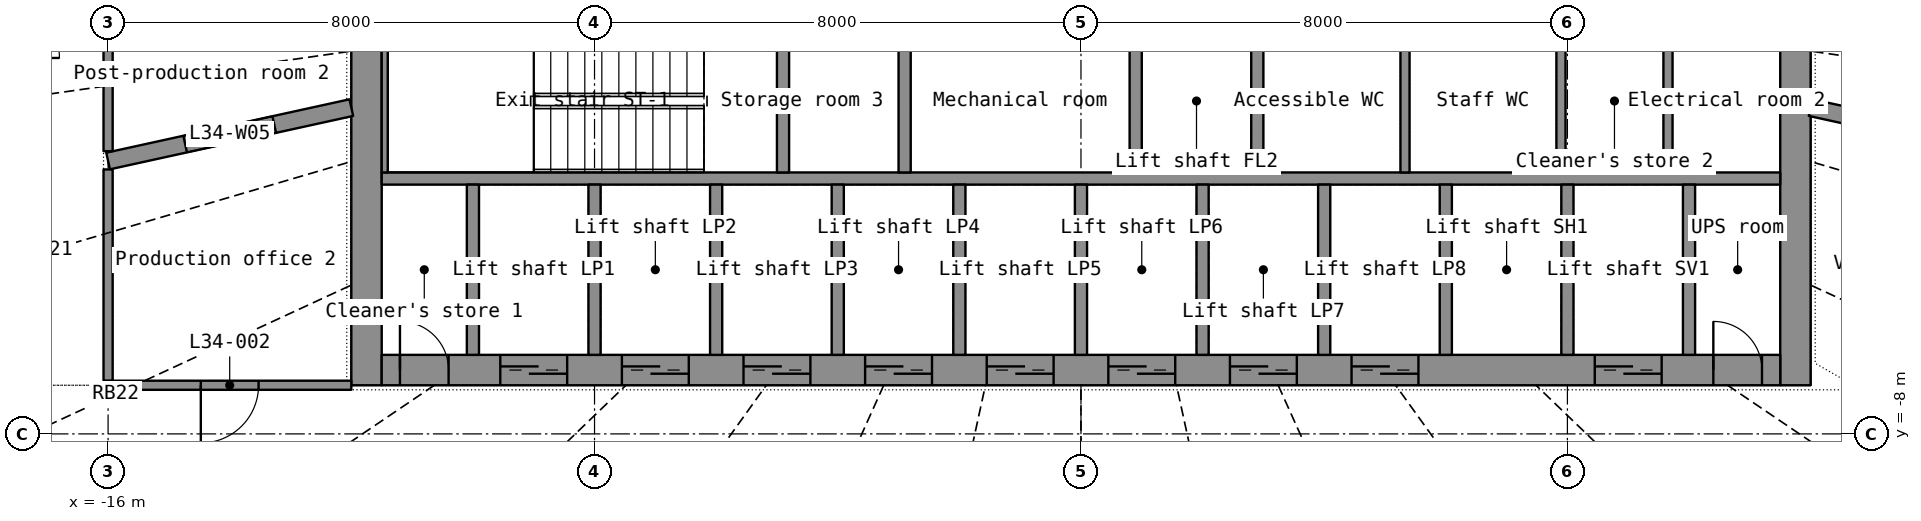
"""IFC4 building model, lengths in metres.
Left out: names, types, materials, properties, quantities, classifications, styles, units other than length and angle.
Written with IfcOpenShell. Run it as: python <this file> out.ifc"""

import sys

from ifc_helpers import new_model, si_unit, direction, frame, frame_2d, origin, place, context, subcontext, project, spatial, rectangle, extrude, element, fill, save


model = new_model("IFC4")
c1 = context("Model", 3, precision=1e-05, world=origin(), true_north=direction((0.0, 1.0)))
c2 = subcontext(c1, "Body", "Model", "MODEL_VIEW")
j1 = project(units=[si_unit("LENGTHUNIT", "METRE"), si_unit("PLANEANGLEUNIT", "RADIAN")], contexts=[c1])
p1 = place(None, origin())
s1 = spatial("IfcSite", under=j1, at=p1, CompositionType="ELEMENT")
p2 = place(p1, origin())
s2 = spatial("IfcBuilding", under=s1, at=p2, CompositionType="ELEMENT")
p3 = place(p2, frame((0.0, 0.0, 141.5)))
s3 = spatial("IfcBuildingStorey", under=s2, at=p3, CompositionType="ELEMENT", Elevation=141.5)
p4 = place(p3, frame((-11.75, -7.2, 0.0), z_axis=(0.0, 0.0, 1.0), x_axis=(0.0, 1.0, 0.0)))
e1 = element("IfcWall", 1, at=p4, inside=s3, PredefinedType="SHEAR", context=c2, shape_type="SweptSolid", body=[
    extrude(rectangle(XDim=14.4, YDim=0.5, at=frame_2d((7.2, 0.0))), origin(), (0.0, 0.0, 1.0), 3.3),
])
p5 = place(p4, frame((6.5, 0.0, 0.0)))
e2 = element("IfcOpeningElement", 2, at=p5, cuts=e1, PredefinedType="OPENING", context=c2, shape_type="SweptSolid", body=[
    extrude(rectangle(XDim=1.4, YDim=2.2, at=frame_2d((0.7, 1.1))), frame((0.0, 0.26, 0.0), z_axis=(0.0, -1.0, 0.0), x_axis=(1.0, 0.0, 0.0)), (0.0, 0.0, 1.0), 0.52),
])
p6 = place(p3, frame((11.75, -7.2, 0.0), z_axis=(0.0, 0.0, 1.0), x_axis=(0.0, 1.0, 0.0)))
e3 = element("IfcWall", 3, at=p6, inside=s3, PredefinedType="SHEAR", context=c2, shape_type="SweptSolid", body=[
    extrude(rectangle(XDim=14.4, YDim=0.5, at=frame_2d((7.2, 0.0))), origin(), (0.0, 0.0, 1.0), 3.3),
])
p7 = place(p6, frame((6.5, 0.0, 0.0)))
e4 = element("IfcOpeningElement", 4, at=p7, cuts=e3, PredefinedType="OPENING", context=c2, shape_type="SweptSolid", body=[
    extrude(rectangle(XDim=1.4, YDim=2.2, at=frame_2d((0.7, 1.1))), frame((0.0, 0.26, 0.0), z_axis=(0.0, -1.0, 0.0), x_axis=(1.0, 0.0, 0.0)), (0.0, 0.0, 1.0), 0.52),
])
p8 = place(p3, frame((-11.5, -6.95, 0.0), z_axis=(0.0, 0.0, 1.0), x_axis=(1.0, 0.0, 0.0)))
e5 = element("IfcWall", 5, at=p8, inside=s3, PredefinedType="SHEAR", context=c2, shape_type="SweptSolid", body=[
    extrude(rectangle(XDim=23.0, YDim=0.5, at=frame_2d((11.5, 0.0))), origin(), (0.0, 0.0, 1.0), 3.3),
])
p9 = place(p8, frame((1.95, 0.0, 0.0)))
e6 = element("IfcOpeningElement", 6, at=p9, cuts=e5, PredefinedType="OPENING", context=c2, shape_type="SweptSolid", body=[
    extrude(rectangle(XDim=1.1, YDim=2.2, at=frame_2d((0.55, 1.1))), frame((0.0, 0.26, 0.0), z_axis=(0.0, -1.0, 0.0), x_axis=(1.0, 0.0, 0.0)), (0.0, 0.0, 1.0), 0.52),
])
p10 = place(p8, frame((3.95, 0.0, 0.0)))
e7 = element("IfcOpeningElement", 7, at=p10, cuts=e5, PredefinedType="OPENING", context=c2, shape_type="SweptSolid", body=[
    extrude(rectangle(XDim=1.1, YDim=2.2, at=frame_2d((0.55, 1.1))), frame((0.0, 0.26, 0.0), z_axis=(0.0, -1.0, 0.0), x_axis=(1.0, 0.0, 0.0)), (0.0, 0.0, 1.0), 0.52),
])
p11 = place(p8, frame((5.95, 0.0, 0.0)))
e8 = element("IfcOpeningElement", 8, at=p11, cuts=e5, PredefinedType="OPENING", context=c2, shape_type="SweptSolid", body=[
    extrude(rectangle(XDim=1.1, YDim=2.2, at=frame_2d((0.55, 1.1))), frame((0.0, 0.26, 0.0), z_axis=(0.0, -1.0, 0.0), x_axis=(1.0, 0.0, 0.0)), (0.0, 0.0, 1.0), 0.52),
])
p12 = place(p8, frame((7.95, 0.0, 0.0)))
e9 = element("IfcOpeningElement", 9, at=p12, cuts=e5, PredefinedType="OPENING", context=c2, shape_type="SweptSolid", body=[
    extrude(rectangle(XDim=1.1, YDim=2.2, at=frame_2d((0.55, 1.1))), frame((0.0, 0.26, 0.0), z_axis=(0.0, -1.0, 0.0), x_axis=(1.0, 0.0, 0.0)), (0.0, 0.0, 1.0), 0.52),
])
p13 = place(p8, frame((9.95, 0.0, 0.0)))
e10 = element("IfcOpeningElement", 10, at=p13, cuts=e5, PredefinedType="OPENING", context=c2, shape_type="SweptSolid", body=[
    extrude(rectangle(XDim=1.1, YDim=2.2, at=frame_2d((0.55, 1.1))), frame((0.0, 0.26, 0.0), z_axis=(0.0, -1.0, 0.0), x_axis=(1.0, 0.0, 0.0)), (0.0, 0.0, 1.0), 0.52),
])
p14 = place(p8, frame((11.95, 0.0, 0.0)))
e11 = element("IfcOpeningElement", 11, at=p14, cuts=e5, PredefinedType="OPENING", context=c2, shape_type="SweptSolid", body=[
    extrude(rectangle(XDim=1.1, YDim=2.2, at=frame_2d((0.55, 1.1))), frame((0.0, 0.26, 0.0), z_axis=(0.0, -1.0, 0.0), x_axis=(1.0, 0.0, 0.0)), (0.0, 0.0, 1.0), 0.52),
])
p15 = place(p8, frame((13.95, 0.0, 0.0)))
e12 = element("IfcOpeningElement", 12, at=p15, cuts=e5, PredefinedType="OPENING", context=c2, shape_type="SweptSolid", body=[
    extrude(rectangle(XDim=1.1, YDim=2.2, at=frame_2d((0.55, 1.1))), frame((0.0, 0.26, 0.0), z_axis=(0.0, -1.0, 0.0), x_axis=(1.0, 0.0, 0.0)), (0.0, 0.0, 1.0), 0.52),
])
p16 = place(p8, frame((15.95, 0.0, 0.0)))
e13 = element("IfcOpeningElement", 13, at=p16, cuts=e5, PredefinedType="OPENING", context=c2, shape_type="SweptSolid", body=[
    extrude(rectangle(XDim=1.1, YDim=2.2, at=frame_2d((0.55, 1.1))), frame((0.0, 0.26, 0.0), z_axis=(0.0, -1.0, 0.0), x_axis=(1.0, 0.0, 0.0)), (0.0, 0.0, 1.0), 0.52),
])
p17 = place(p8, frame((19.95, 0.0, 0.0)))
e14 = element("IfcOpeningElement", 14, at=p17, cuts=e5, PredefinedType="OPENING", context=c2, shape_type="SweptSolid", body=[
    extrude(rectangle(XDim=1.1, YDim=2.2, at=frame_2d((0.55, 1.1))), frame((0.0, 0.26, 0.0), z_axis=(0.0, -1.0, 0.0), x_axis=(1.0, 0.0, 0.0)), (0.0, 0.0, 1.0), 0.52),
])
p18 = place(p8, frame((0.3, 0.0, 0.0)))
e15 = element("IfcOpeningElement", 15, at=p18, cuts=e5, PredefinedType="OPENING", context=c2, shape_type="SweptSolid", body=[
    extrude(rectangle(XDim=0.8, YDim=2.05, at=frame_2d((0.4, 1.025))), frame((0.0, 0.26, 0.0), z_axis=(0.0, -1.0, 0.0), x_axis=(1.0, 0.0, 0.0)), (0.0, 0.0, 1.0), 0.52),
])
p19 = place(p8, frame((21.9, 0.0, 0.0)))
e16 = element("IfcOpeningElement", 16, at=p19, cuts=e5, PredefinedType="OPENING", context=c2, shape_type="SweptSolid", body=[
    extrude(rectangle(XDim=0.8, YDim=2.05, at=frame_2d((0.4, 1.025))), frame((0.0, 0.26, 0.0), z_axis=(0.0, -1.0, 0.0), x_axis=(1.0, 0.0, 0.0)), (0.0, 0.0, 1.0), 0.52),
])
p20 = place(p3, frame((-11.5, -3.8, 0.0), z_axis=(0.0, 0.0, 1.0), x_axis=(1.0, 0.0, 0.0)))
e17 = element("IfcWall", 17, at=p20, inside=s3, PredefinedType="SHEAR", context=c2, shape_type="SweptSolid", body=[
    extrude(rectangle(XDim=23.0, YDim=0.2, at=frame_2d((11.5, 0.0))), origin(), (0.0, 0.0, 1.0), 3.3),
])
for number, where, z_axis, x_axis in (
    (18, (-10.0, -6.7, 0.0), (0.0, 0.0, 1.0), (0.0, 1.0, 0.0)),
    (19, (-8.0, -6.7, 0.0), (0.0, 0.0, 1.0), (0.0, 1.0, 0.0)),
    (20, (-6.0, -6.7, 0.0), (0.0, 0.0, 1.0), (0.0, 1.0, 0.0)),
    (21, (-4.0, -6.7, 0.0), (0.0, 0.0, 1.0), (0.0, 1.0, 0.0)),
    (22, (-2.0, -6.7, 0.0), (0.0, 0.0, 1.0), (0.0, 1.0, 0.0)),
    (23, (0.0, -6.7, 0.0), (0.0, 0.0, 1.0), (0.0, 1.0, 0.0)),
    (24, (2.0, -6.7, 0.0), (0.0, 0.0, 1.0), (0.0, 1.0, 0.0)),
    (25, (4.0, -6.7, 0.0), (0.0, 0.0, 1.0), (0.0, 1.0, 0.0)),
    (26, (6.0, -6.7, 0.0), (0.0, 0.0, 1.0), (0.0, 1.0, 0.0)),
    (27, (8.0, -6.7, 0.0), (0.0, 0.0, 1.0), (0.0, 1.0, 0.0)),
    (28, (10.0, -6.7, 0.0), (0.0, 0.0, 1.0), (0.0, 1.0, 0.0)),
):
    element("IfcWall", number, at=place(p3, frame(where, z_axis=z_axis, x_axis=x_axis)), inside=s3, PredefinedType="SHEAR", context=c2, shape_type="SweptSolid", body=[
        extrude(rectangle(XDim=2.8, YDim=0.2, at=frame_2d((1.4, 0.0))), origin(), (0.0, 0.0, 1.0), 3.3),
    ])
p21 = place(p3, frame((-2.9, -3.7, 0.0), z_axis=(0.0, 0.0, 1.0), x_axis=(0.0, 1.0, 0.0)))
e29 = element("IfcWall", 29, at=p21, inside=s3, PredefinedType="SHEAR", context=c2, shape_type="SweptSolid", body=[
    extrude(rectangle(XDim=7.4, YDim=0.2, at=frame_2d((3.7, 0.0))), origin(), (0.0, 0.0, 1.0), 3.3),
])
p22 = place(p21, frame((3.1, 0.0, 0.0)))
e30 = element("IfcOpeningElement", 30, at=p22, cuts=e29, PredefinedType="OPENING", context=c2, shape_type="SweptSolid", body=[
    extrude(rectangle(XDim=1.2, YDim=2.2, at=frame_2d((0.6, 1.1))), frame((0.0, 0.11, 0.0), z_axis=(0.0, -1.0, 0.0), x_axis=(1.0, 0.0, 0.0)), (0.0, 0.0, 1.0), 0.22),
])
p23 = place(p3, frame((2.9, -3.7, 0.0), z_axis=(0.0, 0.0, 1.0), x_axis=(0.0, 1.0, 0.0)))
e31 = element("IfcWall", 31, at=p23, inside=s3, PredefinedType="SHEAR", context=c2, shape_type="SweptSolid", body=[
    extrude(rectangle(XDim=7.4, YDim=0.2, at=frame_2d((3.7, 0.0))), origin(), (0.0, 0.0, 1.0), 3.3),
])
p24 = place(p23, frame((3.1, 0.0, 0.0)))
e32 = element("IfcOpeningElement", 32, at=p24, cuts=e31, PredefinedType="OPENING", context=c2, shape_type="SweptSolid", body=[
    extrude(rectangle(XDim=1.2, YDim=2.2, at=frame_2d((0.6, 1.1))), frame((0.0, 0.11, 0.0), z_axis=(0.0, -1.0, 0.0), x_axis=(1.0, 0.0, 0.0)), (0.0, 0.0, 1.0), 0.22),
])
p25 = place(p3, frame((0.9, -3.7, 0.0), z_axis=(0.0, 0.0, 1.0), x_axis=(0.0, 1.0, 0.0)))
e33 = element("IfcWall", 33, at=p25, inside=s3, PredefinedType="SHEAR", context=c2, shape_type="SweptSolid", body=[
    extrude(rectangle(XDim=2.35, YDim=0.2, at=frame_2d((1.175, 0.0))), origin(), (0.0, 0.0, 1.0), 3.3),
])
p26 = place(p3, frame((-11.45, -3.7, 0.0), z_axis=(0.0, 0.0, 1.0), x_axis=(0.0, 1.0, 0.0)))
e34 = element("IfcWall", 34, at=p26, inside=s3, PredefinedType="SHEAR", context=c2, shape_type="SweptSolid", body=[
    extrude(rectangle(XDim=2.35, YDim=0.1, at=frame_2d((1.175, 0.0))), origin(), (0.0, 0.0, 1.0), 3.3),
])
p27 = place(p3, frame((-4.9, -3.7, 0.0), z_axis=(0.0, 0.0, 1.0), x_axis=(0.0, 1.0, 0.0)))
e35 = element("IfcWall", 35, at=p27, inside=s3, PredefinedType="SHEAR", context=c2, shape_type="SweptSolid", body=[
    extrude(rectangle(XDim=2.35, YDim=0.2, at=frame_2d((1.175, 0.0))), origin(), (0.0, 0.0, 1.0), 3.3),
])
for number, where, z_axis, x_axis in (
    (36, (5.329, -3.7, 0.0), (0.0, 0.0, 1.0), (0.0, 1.0, 0.0)),
    (37, (7.894, -3.7, 0.0), (0.0, 0.0, 1.0), (0.0, 1.0, 0.0)),
    (38, (9.654, -3.7, 0.0), (0.0, 0.0, 1.0), (0.0, 1.0, 0.0)),
):
    element("IfcWall", number, at=place(p3, frame(where, z_axis=z_axis, x_axis=x_axis)), inside=s3, PredefinedType="PARTITIONING", context=c2, shape_type="SweptSolid", body=[
        extrude(rectangle(XDim=2.35, YDim=0.15, at=frame_2d((1.175, 0.0))), origin(), (0.0, 0.0, 1.0), 3.3),
    ])
p28 = place(p3, frame((-12.0, -2.634, 0.0), z_axis=(0.0, 0.0, 1.0), x_axis=(-0.976750433, -0.214379551, 0.0)))
e39 = element("IfcWall", 39, at=p28, inside=s3, PredefinedType="PARTITIONING", context=c2, shape_type="SweptSolid", body=[
    extrude(rectangle(XDim=4.095, YDim=0.28, at=frame_2d((2.048, 0.0))), origin(), (0.0, 0.0, 1.0), 2.4),
])
p29 = place(p28, frame((1.298, 0.0, 1.0)))
e40 = element("IfcOpeningElement", 40, at=p29, cuts=e39, PredefinedType="OPENING", context=c2, shape_type="SweptSolid", body=[
    extrude(rectangle(XDim=1.5, YDim=1.2, at=frame_2d((0.75, 0.6))), frame((0.0, 0.15, 0.0), z_axis=(0.0, -1.0, 0.0), x_axis=(1.0, 0.0, 0.0)), (0.0, 0.0, 1.0), 0.3),
])
p30 = place(p3, frame((16.0, -3.512, 0.0), z_axis=(0.0, 0.0, 1.0), x_axis=(-0.976750433, 0.214379551, 0.0)))
e41 = element("IfcWall", 41, at=p30, inside=s3, PredefinedType="PARTITIONING", context=c2, shape_type="SweptSolid", body=[
    extrude(rectangle(XDim=4.095, YDim=0.28, at=frame_2d((2.048, 0.0))), origin(), (0.0, 0.0, 1.0), 2.4),
])
p31 = place(p30, frame((1.298, 0.0, 1.0)))
e42 = element("IfcOpeningElement", 42, at=p31, cuts=e41, PredefinedType="OPENING", context=c2, shape_type="SweptSolid", body=[
    extrude(rectangle(XDim=1.5, YDim=1.2, at=frame_2d((0.75, 0.6))), frame((0.0, 0.15, 0.0), z_axis=(0.0, -1.0, 0.0), x_axis=(1.0, 0.0, 0.0)), (0.0, 0.0, 1.0), 0.3),
])
p32 = place(p3, frame((-12.0, -7.2, 0.0), z_axis=(0.0, 0.0, 1.0), x_axis=(-1.0, 0.0, 0.0)))
e43 = element("IfcWall", 43, at=p32, inside=s3, PredefinedType="PARTITIONING", context=c2, shape_type="SweptSolid", body=[
    extrude(rectangle(XDim=4.0, YDim=0.15, at=frame_2d((2.0, 0.0))), origin(), (0.0, 0.0, 1.0), 2.4),
])
p33 = place(p32, frame((1.525, 0.0, 0.0)))
e44 = element("IfcOpeningElement", 44, at=p33, cuts=e43, PredefinedType="OPENING", context=c2, shape_type="SweptSolid", body=[
    extrude(rectangle(XDim=0.95, YDim=2.15, at=frame_2d((0.475, 1.075))), frame((0.0, 0.085, 0.0), z_axis=(0.0, -1.0, 0.0), x_axis=(1.0, 0.0, 0.0)), (0.0, 0.0, 1.0), 0.17),
])
p34 = place(p3, frame((-16.0, -7.123, 0.0), z_axis=(0.0, 0.0, 1.0), x_axis=(0.0, 1.0, 0.0)))
e45 = element("IfcWall", 45, at=p34, inside=s3, PredefinedType="PARTITIONING", context=c2, shape_type="SweptSolid", body=[
    extrude(rectangle(XDim=3.473, YDim=0.15, at=frame_2d((1.736, 0.0))), origin(), (0.0, 0.0, 1.0), 2.4),
])
p35 = place(p3, frame((-16.0, -3.35, 0.0), z_axis=(0.0, 0.0, 1.0), x_axis=(0.0, 1.0, 0.0)))
e46 = element("IfcWall", 46, at=p35, inside=s3, PredefinedType="PARTITIONING", context=c2, shape_type="SweptSolid", body=[
    extrude(rectangle(XDim=2.373, YDim=0.15, at=frame_2d((1.187, 0.0))), origin(), (0.0, 0.0, 1.0), 2.4),
])
p36 = place(p9, origin())
e47 = element("IfcDoor", 47, at=p36, inside=s3, OperationType="DOUBLE_DOOR_SLIDING", PredefinedType="DOOR", context=c2, shape_type="SweptSolid", body=[
    extrude(rectangle(XDim=1.1, YDim=2.2, at=frame_2d((0.55, 1.1))), frame((0.0, 0.025, 0.0), z_axis=(0.0, -1.0, 0.0), x_axis=(1.0, 0.0, 0.0)), (0.0, 0.0, 1.0), 0.05),
])
fill(e6, e47)
p37 = place(p10, origin())
e48 = element("IfcDoor", 48, at=p37, inside=s3, OperationType="DOUBLE_DOOR_SLIDING", PredefinedType="DOOR", context=c2, shape_type="SweptSolid", body=[
    extrude(rectangle(XDim=1.1, YDim=2.2, at=frame_2d((0.55, 1.1))), frame((0.0, 0.025, 0.0), z_axis=(0.0, -1.0, 0.0), x_axis=(1.0, 0.0, 0.0)), (0.0, 0.0, 1.0), 0.05),
])
fill(e7, e48)
p38 = place(p11, origin())
e49 = element("IfcDoor", 49, at=p38, inside=s3, OperationType="DOUBLE_DOOR_SLIDING", PredefinedType="DOOR", context=c2, shape_type="SweptSolid", body=[
    extrude(rectangle(XDim=1.1, YDim=2.2, at=frame_2d((0.55, 1.1))), frame((0.0, 0.025, 0.0), z_axis=(0.0, -1.0, 0.0), x_axis=(1.0, 0.0, 0.0)), (0.0, 0.0, 1.0), 0.05),
])
fill(e8, e49)
p39 = place(p12, origin())
e50 = element("IfcDoor", 50, at=p39, inside=s3, OperationType="DOUBLE_DOOR_SLIDING", PredefinedType="DOOR", context=c2, shape_type="SweptSolid", body=[
    extrude(rectangle(XDim=1.1, YDim=2.2, at=frame_2d((0.55, 1.1))), frame((0.0, 0.025, 0.0), z_axis=(0.0, -1.0, 0.0), x_axis=(1.0, 0.0, 0.0)), (0.0, 0.0, 1.0), 0.05),
])
fill(e9, e50)
p40 = place(p13, origin())
e51 = element("IfcDoor", 51, at=p40, inside=s3, OperationType="DOUBLE_DOOR_SLIDING", PredefinedType="DOOR", context=c2, shape_type="SweptSolid", body=[
    extrude(rectangle(XDim=1.1, YDim=2.2, at=frame_2d((0.55, 1.1))), frame((0.0, 0.025, 0.0), z_axis=(0.0, -1.0, 0.0), x_axis=(1.0, 0.0, 0.0)), (0.0, 0.0, 1.0), 0.05),
])
fill(e10, e51)
p41 = place(p14, origin())
e52 = element("IfcDoor", 52, at=p41, inside=s3, OperationType="DOUBLE_DOOR_SLIDING", PredefinedType="DOOR", context=c2, shape_type="SweptSolid", body=[
    extrude(rectangle(XDim=1.1, YDim=2.2, at=frame_2d((0.55, 1.1))), frame((0.0, 0.025, 0.0), z_axis=(0.0, -1.0, 0.0), x_axis=(1.0, 0.0, 0.0)), (0.0, 0.0, 1.0), 0.05),
])
fill(e11, e52)
p42 = place(p15, origin())
e53 = element("IfcDoor", 53, at=p42, inside=s3, OperationType="DOUBLE_DOOR_SLIDING", PredefinedType="DOOR", context=c2, shape_type="SweptSolid", body=[
    extrude(rectangle(XDim=1.1, YDim=2.2, at=frame_2d((0.55, 1.1))), frame((0.0, 0.025, 0.0), z_axis=(0.0, -1.0, 0.0), x_axis=(1.0, 0.0, 0.0)), (0.0, 0.0, 1.0), 0.05),
])
fill(e12, e53)
p43 = place(p16, origin())
e54 = element("IfcDoor", 54, at=p43, inside=s3, OperationType="DOUBLE_DOOR_SLIDING", PredefinedType="DOOR", context=c2, shape_type="SweptSolid", body=[
    extrude(rectangle(XDim=1.1, YDim=2.2, at=frame_2d((0.55, 1.1))), frame((0.0, 0.025, 0.0), z_axis=(0.0, -1.0, 0.0), x_axis=(1.0, 0.0, 0.0)), (0.0, 0.0, 1.0), 0.05),
])
fill(e13, e54)
p44 = place(p17, origin())
e55 = element("IfcDoor", 55, at=p44, inside=s3, OperationType="DOUBLE_DOOR_SLIDING", PredefinedType="DOOR", context=c2, shape_type="SweptSolid", body=[
    extrude(rectangle(XDim=1.1, YDim=2.2, at=frame_2d((0.55, 1.1))), frame((0.0, 0.025, 0.0), z_axis=(0.0, -1.0, 0.0), x_axis=(1.0, 0.0, 0.0)), (0.0, 0.0, 1.0), 0.05),
])
fill(e14, e55)
p45 = place(p18, origin())
e56 = element("IfcDoor", 56, at=p45, inside=s3, OperationType="SINGLE_SWING_LEFT", PredefinedType="DOOR", context=c2, shape_type="SweptSolid", body=[
    extrude(rectangle(XDim=0.8, YDim=2.05, at=frame_2d((0.4, 1.025))), frame((0.0, 0.025, 0.0), z_axis=(0.0, -1.0, 0.0), x_axis=(1.0, 0.0, 0.0)), (0.0, 0.0, 1.0), 0.05),
])
fill(e15, e56)
p46 = place(p19, origin())
e57 = element("IfcDoor", 57, at=p46, inside=s3, OperationType="SINGLE_SWING_LEFT", PredefinedType="DOOR", context=c2, shape_type="SweptSolid", body=[
    extrude(rectangle(XDim=0.8, YDim=2.05, at=frame_2d((0.4, 1.025))), frame((0.0, 0.025, 0.0), z_axis=(0.0, -1.0, 0.0), x_axis=(1.0, 0.0, 0.0)), (0.0, 0.0, 1.0), 0.05),
])
fill(e16, e57)
p47 = place(p33, origin())
e58 = element("IfcDoor", 58, at=p47, inside=s3, OperationType="SINGLE_SWING_RIGHT", PredefinedType="DOOR", context=c2, shape_type="SweptSolid", body=[
    extrude(rectangle(XDim=0.95, YDim=2.15, at=frame_2d((0.475, 1.075))), frame((0.0, 0.025, 0.0), z_axis=(0.0, -1.0, 0.0), x_axis=(1.0, 0.0, 0.0)), (0.0, 0.0, 1.0), 0.05),
])
fill(e44, e58)
p48 = place(p29, origin())
e59 = element("IfcWindow", 59, at=p48, inside=s3, PartitioningType="SINGLE_PANEL", PredefinedType="WINDOW", context=c2, shape_type="SweptSolid", body=[
    extrude(rectangle(XDim=1.5, YDim=1.2, at=frame_2d((0.75, 0.6))), frame((0.0, 0.03, 0.0), z_axis=(0.0, -1.0, 0.0), x_axis=(1.0, 0.0, 0.0)), (0.0, 0.0, 1.0), 0.06),
])
fill(e40, e59)
save(model, sys.argv[1])
